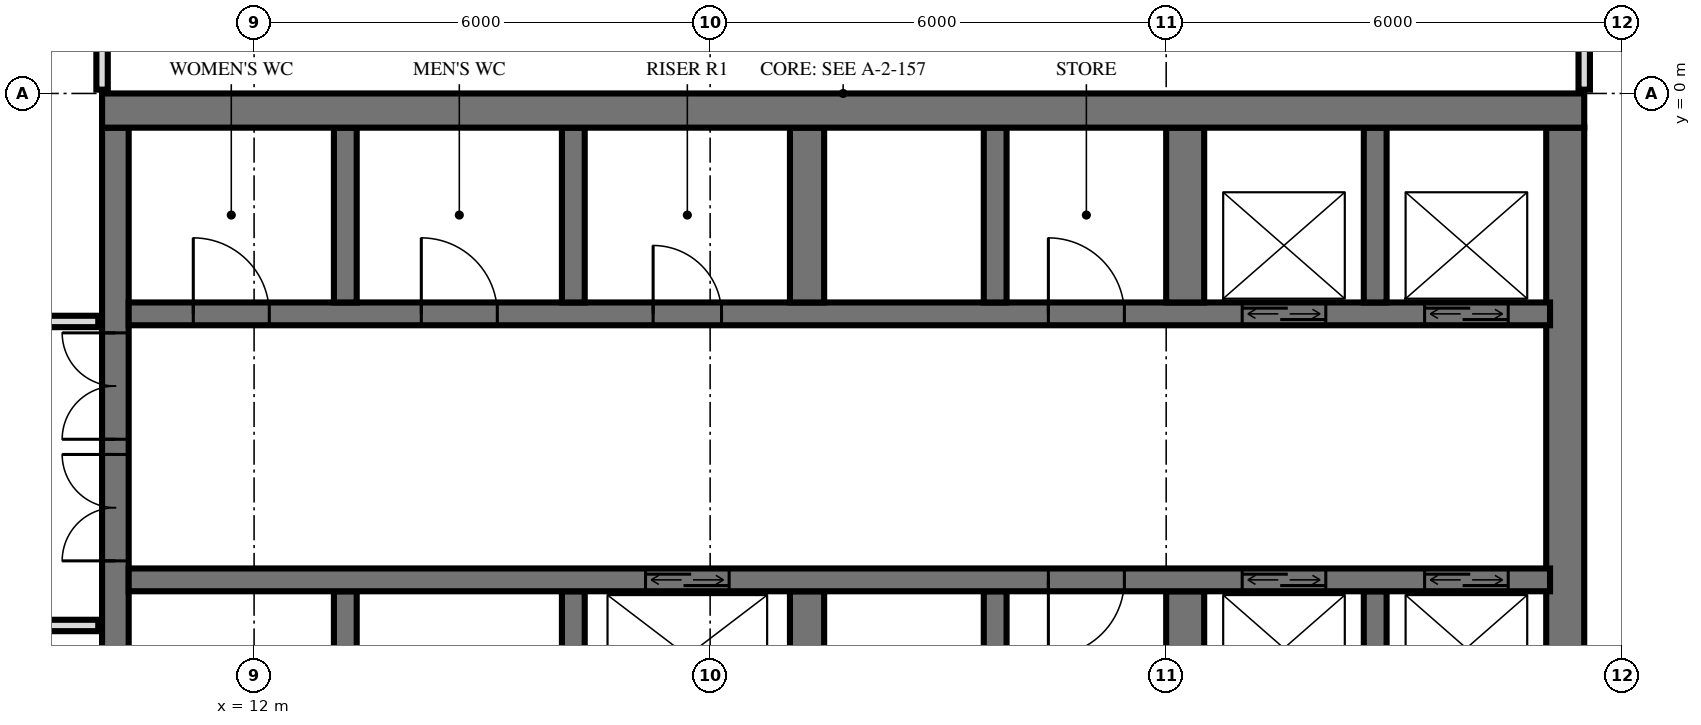
"""IFC4 building model, lengths in metres.
Left out: names, types, materials, properties, quantities, classifications, styles, units other than length and angle.
Written with IfcOpenShell. Run it as: python <this file> out.ifc"""

import sys

from ifc_helpers import new_model, si_unit, direction, frame, frame_2d, origin, place, context, subcontext, project, spatial, rectangle, extrude, element, fill, save


model = new_model("IFC4")
c1 = context("Model", 3, precision=1e-05, world=origin(), true_north=direction((0.0, 1.0)))
c2 = subcontext(c1, "Body", "Model", "MODEL_VIEW")
j1 = project(units=[si_unit("LENGTHUNIT", "METRE"), si_unit("PLANEANGLEUNIT", "RADIAN")], contexts=[c1])
p1 = place(None, origin())
s1 = spatial("IfcSite", under=j1, at=p1, CompositionType="ELEMENT")
p2 = place(p1, origin())
s2 = spatial("IfcBuilding", under=s1, at=p2, CompositionType="ELEMENT")
p3 = place(p2, frame((0.0, 0.0, 96.0)))
s3 = spatial("IfcBuildingStorey", under=s2, at=p3, CompositionType="ELEMENT", Elevation=96.0)
p4 = place(p3, frame((10.0, -0.225, 0.0), z_axis=(0.0, 0.0, 1.0), x_axis=(1.0, 0.0, 0.0)))
e1 = element("IfcWall", 1, at=p4, inside=s3, PredefinedType="SHEAR", context=c2, shape_type="SweptSolid", body=[
    extrude(rectangle(XDim=19.5, YDim=0.45, at=frame_2d((9.75, 0.0))), origin(), (0.0, 0.0, 1.0), 3.6),
])
p5 = place(p3, frame((10.175, -14.55, 0.0), z_axis=(0.0, 0.0, 1.0), x_axis=(0.0, 1.0, 0.0)))
e2 = element("IfcWall", 2, at=p5, inside=s3, PredefinedType="SHEAR", context=c2, shape_type="SweptSolid", body=[
    extrude(rectangle(XDim=14.1, YDim=0.35, at=frame_2d((7.05, 0.0))), origin(), (0.0, 0.0, 1.0), 3.6),
])
p6 = place(p5, frame((8.4, 0.0, 0.0)))
e3 = element("IfcOpeningElement", 3, at=p6, cuts=e2, PredefinedType="OPENING", context=c2, shape_type="SweptSolid", body=[
    extrude(rectangle(XDim=1.4, YDim=2.4, at=frame_2d((0.7, 1.2))), frame((0.0, 0.185, 0.0), z_axis=(0.0, -1.0, 0.0), x_axis=(1.0, 0.0, 0.0)), (0.0, 0.0, 1.0), 0.37),
])
p7 = place(p5, frame((10.0, 0.0, 0.0)))
e4 = element("IfcOpeningElement", 4, at=p7, cuts=e2, PredefinedType="OPENING", context=c2, shape_type="SweptSolid", body=[
    extrude(rectangle(XDim=1.4, YDim=2.4, at=frame_2d((0.7, 1.2))), frame((0.0, 0.185, 0.0), z_axis=(0.0, -1.0, 0.0), x_axis=(1.0, 0.0, 0.0)), (0.0, 0.0, 1.0), 0.37),
])
p8 = place(p5, frame((4.0, 0.0, 0.0)))
e5 = element("IfcOpeningElement", 5, at=p8, cuts=e2, PredefinedType="OPENING", context=c2, shape_type="SweptSolid", body=[
    extrude(rectangle(XDim=1.2, YDim=2.1, at=frame_2d((0.6, 1.05))), frame((0.0, 0.185, 0.0), z_axis=(0.0, -1.0, 0.0), x_axis=(1.0, 0.0, 0.0)), (0.0, 0.0, 1.0), 0.37),
])
p9 = place(p3, frame((29.25, -14.55, 0.0), z_axis=(0.0, 0.0, 1.0), x_axis=(0.0, 1.0, 0.0)))
e6 = element("IfcWall", 6, at=p9, inside=s3, PredefinedType="SHEAR", context=c2, shape_type="SweptSolid", body=[
    extrude(rectangle(XDim=14.1, YDim=0.5, at=frame_2d((7.05, 0.0))), origin(), (0.0, 0.0, 1.0), 3.6),
])
p10 = place(p3, frame((10.35, -2.9, 0.0), z_axis=(0.0, 0.0, 1.0), x_axis=(1.0, 0.0, 0.0)))
e7 = element("IfcWall", 7, at=p10, inside=s3, PredefinedType="SHEAR", context=c2, shape_type="SweptSolid", body=[
    extrude(rectangle(XDim=18.7, YDim=0.3, at=frame_2d((9.35, 0.0))), origin(), (0.0, 0.0, 1.0), 3.6),
])
p11 = place(p10, frame((14.65, 0.0, 0.0)))
e8 = element("IfcOpeningElement", 8, at=p11, cuts=e7, PredefinedType="OPENING", context=c2, shape_type="SweptSolid", body=[
    extrude(rectangle(XDim=1.1, YDim=2.1, at=frame_2d((0.55, 1.05))), frame((0.0, 0.16, 0.0), z_axis=(0.0, -1.0, 0.0), x_axis=(1.0, 0.0, 0.0)), (0.0, 0.0, 1.0), 0.32),
])
p12 = place(p10, frame((17.05, 0.0, 0.0)))
e9 = element("IfcOpeningElement", 9, at=p12, cuts=e7, PredefinedType="OPENING", context=c2, shape_type="SweptSolid", body=[
    extrude(rectangle(XDim=1.1, YDim=2.1, at=frame_2d((0.55, 1.05))), frame((0.0, 0.16, 0.0), z_axis=(0.0, -1.0, 0.0), x_axis=(1.0, 0.0, 0.0)), (0.0, 0.0, 1.0), 0.32),
])
p13 = place(p10, frame((6.9, 0.0, 0.0)))
e10 = element("IfcOpeningElement", 10, at=p13, cuts=e7, PredefinedType="OPENING", context=c2, shape_type="SweptSolid", body=[
    extrude(rectangle(XDim=0.9, YDim=2.1, at=frame_2d((0.45, 1.05))), frame((0.0, 0.16, 0.0), z_axis=(0.0, -1.0, 0.0), x_axis=(1.0, 0.0, 0.0)), (0.0, 0.0, 1.0), 0.32),
])
p14 = place(p10, frame((0.85, 0.0, 0.0)))
e11 = element("IfcOpeningElement", 11, at=p14, cuts=e7, PredefinedType="OPENING", context=c2, shape_type="SweptSolid", body=[
    extrude(rectangle(XDim=1.0, YDim=2.1, at=frame_2d((0.5, 1.05))), frame((0.0, 0.16, 0.0), z_axis=(0.0, -1.0, 0.0), x_axis=(1.0, 0.0, 0.0)), (0.0, 0.0, 1.0), 0.32),
])
p15 = place(p10, frame((3.85, 0.0, 0.0)))
e12 = element("IfcOpeningElement", 12, at=p15, cuts=e7, PredefinedType="OPENING", context=c2, shape_type="SweptSolid", body=[
    extrude(rectangle(XDim=1.0, YDim=2.1, at=frame_2d((0.5, 1.05))), frame((0.0, 0.16, 0.0), z_axis=(0.0, -1.0, 0.0), x_axis=(1.0, 0.0, 0.0)), (0.0, 0.0, 1.0), 0.32),
])
p16 = place(p10, frame((12.1, 0.0, 0.0)))
e13 = element("IfcOpeningElement", 13, at=p16, cuts=e7, PredefinedType="OPENING", context=c2, shape_type="SweptSolid", body=[
    extrude(rectangle(XDim=1.0, YDim=2.1, at=frame_2d((0.5, 1.05))), frame((0.0, 0.16, 0.0), z_axis=(0.0, -1.0, 0.0), x_axis=(1.0, 0.0, 0.0)), (0.0, 0.0, 1.0), 0.32),
])
p17 = place(p3, frame((10.35, -6.4, 0.0), z_axis=(0.0, 0.0, 1.0), x_axis=(1.0, 0.0, 0.0)))
e14 = element("IfcWall", 14, at=p17, inside=s3, PredefinedType="SHEAR", context=c2, shape_type="SweptSolid", body=[
    extrude(rectangle(XDim=18.7, YDim=0.3, at=frame_2d((9.35, 0.0))), origin(), (0.0, 0.0, 1.0), 3.6),
])
p18 = place(p17, frame((14.65, 0.0, 0.0)))
e15 = element("IfcOpeningElement", 15, at=p18, cuts=e14, PredefinedType="OPENING", context=c2, shape_type="SweptSolid", body=[
    extrude(rectangle(XDim=1.1, YDim=2.1, at=frame_2d((0.55, 1.05))), frame((0.0, 0.16, 0.0), z_axis=(0.0, -1.0, 0.0), x_axis=(1.0, 0.0, 0.0)), (0.0, 0.0, 1.0), 0.32),
])
p19 = place(p17, frame((17.05, 0.0, 0.0)))
e16 = element("IfcOpeningElement", 16, at=p19, cuts=e14, PredefinedType="OPENING", context=c2, shape_type="SweptSolid", body=[
    extrude(rectangle(XDim=1.1, YDim=2.1, at=frame_2d((0.55, 1.05))), frame((0.0, 0.16, 0.0), z_axis=(0.0, -1.0, 0.0), x_axis=(1.0, 0.0, 0.0)), (0.0, 0.0, 1.0), 0.32),
])
p20 = place(p17, frame((6.8, 0.0, 0.0)))
e17 = element("IfcOpeningElement", 17, at=p20, cuts=e14, PredefinedType="OPENING", context=c2, shape_type="SweptSolid", body=[
    extrude(rectangle(XDim=1.1, YDim=2.1, at=frame_2d((0.55, 1.05))), frame((0.0, 0.16, 0.0), z_axis=(0.0, -1.0, 0.0), x_axis=(1.0, 0.0, 0.0)), (0.0, 0.0, 1.0), 0.32),
])
p21 = place(p17, frame((12.1, 0.0, 0.0)))
e18 = element("IfcOpeningElement", 18, at=p21, cuts=e14, PredefinedType="OPENING", context=c2, shape_type="SweptSolid", body=[
    extrude(rectangle(XDim=1.0, YDim=2.1, at=frame_2d((0.5, 1.05))), frame((0.0, 0.16, 0.0), z_axis=(0.0, -1.0, 0.0), x_axis=(1.0, 0.0, 0.0)), (0.0, 0.0, 1.0), 0.32),
])
for number, where, z_axis, x_axis in (
    (19, (13.2, -2.75, 0.0), (0.0, 0.0, 1.0), (0.0, 1.0, 0.0)),
    (20, (13.2, -8.85, 0.0), (0.0, 0.0, 1.0), (0.0, 1.0, 0.0)),
    (21, (16.2, -2.75, 0.0), (0.0, 0.0, 1.0), (0.0, 1.0, 0.0)),
    (22, (16.2, -8.85, 0.0), (0.0, 0.0, 1.0), (0.0, 1.0, 0.0)),
):
    element("IfcWall", number, at=place(p3, frame(where, z_axis=z_axis, x_axis=x_axis)), inside=s3, PredefinedType="SHEAR", context=c2, shape_type="SweptSolid", body=[
        extrude(rectangle(XDim=2.3, YDim=0.3, at=frame_2d((1.15, 0.0))), origin(), (0.0, 0.0, 1.0), 3.6),
    ])
for number, where, z_axis, x_axis in (
    (23, (19.275, -2.75, 0.0), (0.0, 0.0, 1.0), (0.0, 1.0, 0.0)),
    (24, (19.275, -8.85, 0.0), (0.0, 0.0, 1.0), (0.0, 1.0, 0.0)),
):
    element("IfcWall", number, at=place(p3, frame(where, z_axis=z_axis, x_axis=x_axis)), inside=s3, PredefinedType="SHEAR", context=c2, shape_type="SweptSolid", body=[
        extrude(rectangle(XDim=2.3, YDim=0.45, at=frame_2d((1.15, 0.0))), origin(), (0.0, 0.0, 1.0), 3.6),
    ])
for number, where, z_axis, x_axis in (
    (25, (21.75, -2.75, 0.0), (0.0, 0.0, 1.0), (0.0, 1.0, 0.0)),
    (26, (21.75, -8.85, 0.0), (0.0, 0.0, 1.0), (0.0, 1.0, 0.0)),
):
    element("IfcWall", number, at=place(p3, frame(where, z_axis=z_axis, x_axis=x_axis)), inside=s3, PredefinedType="SHEAR", context=c2, shape_type="SweptSolid", body=[
        extrude(rectangle(XDim=2.3, YDim=0.3, at=frame_2d((1.15, 0.0))), origin(), (0.0, 0.0, 1.0), 3.6),
    ])
for number, where, z_axis, x_axis in (
    (27, (24.25, -2.75, 0.0), (0.0, 0.0, 1.0), (0.0, 1.0, 0.0)),
    (28, (24.25, -8.85, 0.0), (0.0, 0.0, 1.0), (0.0, 1.0, 0.0)),
):
    element("IfcWall", number, at=place(p3, frame(where, z_axis=z_axis, x_axis=x_axis)), inside=s3, PredefinedType="SHEAR", context=c2, shape_type="SweptSolid", body=[
        extrude(rectangle(XDim=2.3, YDim=0.5, at=frame_2d((1.15, 0.0))), origin(), (0.0, 0.0, 1.0), 3.6),
    ])
for number, where, z_axis, x_axis in (
    (29, (26.75, -2.75, 0.0), (0.0, 0.0, 1.0), (0.0, 1.0, 0.0)),
    (30, (26.75, -8.85, 0.0), (0.0, 0.0, 1.0), (0.0, 1.0, 0.0)),
):
    element("IfcWall", number, at=place(p3, frame(where, z_axis=z_axis, x_axis=x_axis)), inside=s3, PredefinedType="SHEAR", context=c2, shape_type="SweptSolid", body=[
        extrude(rectangle(XDim=2.3, YDim=0.3, at=frame_2d((1.15, 0.0))), origin(), (0.0, 0.0, 1.0), 3.6),
    ])
p22 = place(p3, frame((29.5, 0.05, 0.0), z_axis=(0.0, 0.0, 1.0), x_axis=(0.0, 1.0, 0.0)))
e31 = element("IfcWall", 31, at=p22, inside=s3, PredefinedType="PARTITIONING", context=c2, shape_type="SweptSolid", body=[
    extrude(rectangle(XDim=0.827, YDim=0.15, at=frame_2d((0.414, 0.0))), origin(), (0.0, 0.0, 1.0), 3.32),
])
p23 = place(p3, frame((10.0, 0.05, 0.0), z_axis=(0.0, 0.0, 1.0), x_axis=(0.0, 1.0, 0.0)))
e32 = element("IfcWall", 32, at=p23, inside=s3, PredefinedType="PARTITIONING", context=c2, shape_type="SweptSolid", body=[
    extrude(rectangle(XDim=0.97, YDim=0.15, at=frame_2d((0.485, 0.0))), origin(), (0.0, 0.0, 1.0), 3.32),
])
p24 = place(p3, frame((-9.95, -7.0, 0.0), z_axis=(0.0, 0.0, 1.0), x_axis=(1.0, 0.0, 0.0)))
e33 = element("IfcWall", 33, at=p24, inside=s3, PredefinedType="PARTITIONING", context=c2, shape_type="SweptSolid", body=[
    extrude(rectangle(XDim=19.9, YDim=0.15, at=frame_2d((9.95, 0.0))), origin(), (0.0, 0.0, 1.0), 3.32),
])
p25 = place(p24, frame((9.45, 0.0, 0.0)))
e34 = element("IfcOpeningElement", 34, at=p25, cuts=e33, PredefinedType="OPENING", context=c2, shape_type="SweptSolid", body=[
    extrude(rectangle(XDim=1.0, YDim=2.1, at=frame_2d((0.5, 1.05))), frame((0.0, 0.085, 0.0), z_axis=(0.0, -1.0, 0.0), x_axis=(1.0, 0.0, 0.0)), (0.0, 0.0, 1.0), 0.17),
])
p26 = place(p24, frame((3.45, 0.0, 0.0)))
e35 = element("IfcOpeningElement", 35, at=p26, cuts=e33, PredefinedType="OPENING", context=c2, shape_type="SweptSolid", body=[
    extrude(rectangle(XDim=1.0, YDim=2.1, at=frame_2d((0.5, 1.05))), frame((0.0, 0.085, 0.0), z_axis=(0.0, -1.0, 0.0), x_axis=(1.0, 0.0, 0.0)), (0.0, 0.0, 1.0), 0.17),
])
p27 = place(p3, frame((-9.95, -3.0, 0.0), z_axis=(0.0, 0.0, 1.0), x_axis=(1.0, 0.0, 0.0)))
e36 = element("IfcWall", 36, at=p27, inside=s3, PredefinedType="PARTITIONING", context=c2, shape_type="SweptSolid", body=[
    extrude(rectangle(XDim=19.9, YDim=0.15, at=frame_2d((9.95, 0.0))), origin(), (0.0, 0.0, 1.0), 3.32),
])
p28 = place(p27, frame((0.95, 0.0, 0.0)))
e37 = element("IfcOpeningElement", 37, at=p28, cuts=e36, PredefinedType="OPENING", context=c2, shape_type="SweptSolid", body=[
    extrude(rectangle(XDim=1.0, YDim=2.1, at=frame_2d((0.5, 1.05))), frame((0.0, 0.085, 0.0), z_axis=(0.0, -1.0, 0.0), x_axis=(1.0, 0.0, 0.0)), (0.0, 0.0, 1.0), 0.17),
])
p29 = place(p27, frame((3.7, 0.0, 0.0)))
e38 = element("IfcOpeningElement", 38, at=p29, cuts=e36, PredefinedType="OPENING", context=c2, shape_type="SweptSolid", body=[
    extrude(rectangle(XDim=1.0, YDim=2.1, at=frame_2d((0.5, 1.05))), frame((0.0, 0.085, 0.0), z_axis=(0.0, -1.0, 0.0), x_axis=(1.0, 0.0, 0.0)), (0.0, 0.0, 1.0), 0.17),
])
p30 = place(p27, frame((6.7, 0.0, 0.0)))
e39 = element("IfcOpeningElement", 39, at=p30, cuts=e36, PredefinedType="OPENING", context=c2, shape_type="SweptSolid", body=[
    extrude(rectangle(XDim=1.0, YDim=2.1, at=frame_2d((0.5, 1.05))), frame((0.0, 0.085, 0.0), z_axis=(0.0, -1.0, 0.0), x_axis=(1.0, 0.0, 0.0)), (0.0, 0.0, 1.0), 0.17),
])
p31 = place(p27, frame((13.95, 0.0, 0.0)))
e40 = element("IfcOpeningElement", 40, at=p31, cuts=e36, PredefinedType="OPENING", context=c2, shape_type="SweptSolid", body=[
    extrude(rectangle(XDim=1.0, YDim=2.1, at=frame_2d((0.5, 1.05))), frame((0.0, 0.085, 0.0), z_axis=(0.0, -1.0, 0.0), x_axis=(1.0, 0.0, 0.0)), (0.0, 0.0, 1.0), 0.17),
])
p32 = place(p11, origin())
e41 = element("IfcDoor", 41, at=p32, inside=s3, OperationType="DOUBLE_DOOR_SLIDING", PredefinedType="USERDEFINED", context=c2, shape_type="SweptSolid", body=[
    extrude(rectangle(XDim=1.1, YDim=2.1, at=frame_2d((0.55, 1.05))), frame((0.0, 0.025, 0.0), z_axis=(0.0, -1.0, 0.0), x_axis=(1.0, 0.0, 0.0)), (0.0, 0.0, 1.0), 0.05),
])
fill(e8, e41)
p33 = place(p12, origin())
e42 = element("IfcDoor", 42, at=p33, inside=s3, OperationType="DOUBLE_DOOR_SLIDING", PredefinedType="USERDEFINED", context=c2, shape_type="SweptSolid", body=[
    extrude(rectangle(XDim=1.1, YDim=2.1, at=frame_2d((0.55, 1.05))), frame((0.0, 0.025, 0.0), z_axis=(0.0, -1.0, 0.0), x_axis=(1.0, 0.0, 0.0)), (0.0, 0.0, 1.0), 0.05),
])
fill(e9, e42)
p34 = place(p18, origin())
e43 = element("IfcDoor", 43, at=p34, inside=s3, OperationType="DOUBLE_DOOR_SLIDING", PredefinedType="USERDEFINED", context=c2, shape_type="SweptSolid", body=[
    extrude(rectangle(XDim=1.1, YDim=2.1, at=frame_2d((0.55, 1.05))), frame((0.0, 0.025, 0.0), z_axis=(0.0, -1.0, 0.0), x_axis=(1.0, 0.0, 0.0)), (0.0, 0.0, 1.0), 0.05),
])
fill(e15, e43)
p35 = place(p19, origin())
e44 = element("IfcDoor", 44, at=p35, inside=s3, OperationType="DOUBLE_DOOR_SLIDING", PredefinedType="USERDEFINED", context=c2, shape_type="SweptSolid", body=[
    extrude(rectangle(XDim=1.1, YDim=2.1, at=frame_2d((0.55, 1.05))), frame((0.0, 0.025, 0.0), z_axis=(0.0, -1.0, 0.0), x_axis=(1.0, 0.0, 0.0)), (0.0, 0.0, 1.0), 0.05),
])
fill(e16, e44)
p36 = place(p20, origin())
e45 = element("IfcDoor", 45, at=p36, inside=s3, OperationType="DOUBLE_DOOR_SLIDING", PredefinedType="USERDEFINED", context=c2, shape_type="SweptSolid", body=[
    extrude(rectangle(XDim=1.1, YDim=2.1, at=frame_2d((0.55, 1.05))), frame((0.0, 0.025, 0.0), z_axis=(0.0, -1.0, 0.0), x_axis=(1.0, 0.0, 0.0)), (0.0, 0.0, 1.0), 0.05),
])
fill(e17, e45)
p37 = place(p6, origin())
e46 = element("IfcDoor", 46, at=p37, inside=s3, OperationType="DOUBLE_DOOR_SINGLE_SWING", PredefinedType="DOOR", context=c2, shape_type="SweptSolid", body=[
    extrude(rectangle(XDim=1.4, YDim=2.4, at=frame_2d((0.7, 1.2))), frame((0.0, 0.025, 0.0), z_axis=(0.0, -1.0, 0.0), x_axis=(1.0, 0.0, 0.0)), (0.0, 0.0, 1.0), 0.05),
])
fill(e3, e46)
p38 = place(p7, origin())
e47 = element("IfcDoor", 47, at=p38, inside=s3, OperationType="DOUBLE_DOOR_SINGLE_SWING", PredefinedType="DOOR", context=c2, shape_type="SweptSolid", body=[
    extrude(rectangle(XDim=1.4, YDim=2.4, at=frame_2d((0.7, 1.2))), frame((0.0, 0.025, 0.0), z_axis=(0.0, -1.0, 0.0), x_axis=(1.0, 0.0, 0.0)), (0.0, 0.0, 1.0), 0.05),
])
fill(e4, e47)
p39 = place(p13, origin())
e48 = element("IfcDoor", 48, at=p39, inside=s3, OperationType="SINGLE_SWING_RIGHT", PredefinedType="DOOR", context=c2, shape_type="SweptSolid", body=[
    extrude(rectangle(XDim=0.9, YDim=2.1, at=frame_2d((0.45, 1.05))), frame((0.0, 0.025, 0.0), z_axis=(0.0, -1.0, 0.0), x_axis=(1.0, 0.0, 0.0)), (0.0, 0.0, 1.0), 0.05),
])
fill(e10, e48)
p40 = place(p14, origin())
e49 = element("IfcDoor", 49, at=p40, inside=s3, OperationType="SINGLE_SWING_RIGHT", PredefinedType="DOOR", context=c2, shape_type="SweptSolid", body=[
    extrude(rectangle(XDim=1.0, YDim=2.1, at=frame_2d((0.5, 1.05))), frame((0.0, 0.025, 0.0), z_axis=(0.0, -1.0, 0.0), x_axis=(1.0, 0.0, 0.0)), (0.0, 0.0, 1.0), 0.05),
])
fill(e11, e49)
p41 = place(p15, origin())
e50 = element("IfcDoor", 50, at=p41, inside=s3, OperationType="SINGLE_SWING_RIGHT", PredefinedType="DOOR", context=c2, shape_type="SweptSolid", body=[
    extrude(rectangle(XDim=1.0, YDim=2.1, at=frame_2d((0.5, 1.05))), frame((0.0, 0.025, 0.0), z_axis=(0.0, -1.0, 0.0), x_axis=(1.0, 0.0, 0.0)), (0.0, 0.0, 1.0), 0.05),
])
fill(e12, e50)
p42 = place(p16, origin())
e51 = element("IfcDoor", 51, at=p42, inside=s3, OperationType="SINGLE_SWING_RIGHT", PredefinedType="DOOR", context=c2, shape_type="SweptSolid", body=[
    extrude(rectangle(XDim=1.0, YDim=2.1, at=frame_2d((0.5, 1.05))), frame((0.0, 0.025, 0.0), z_axis=(0.0, -1.0, 0.0), x_axis=(1.0, 0.0, 0.0)), (0.0, 0.0, 1.0), 0.05),
])
fill(e13, e51)
p43 = place(p21, frame((0.5, 0.0, 0.0), z_axis=(0.0, 0.0, 1.0), x_axis=(-1.0, 0.0, 0.0)))
e52 = element("IfcDoor", 52, at=p43, inside=s3, OperationType="SINGLE_SWING_LEFT", PredefinedType="DOOR", context=c2, shape_type="SweptSolid", body=[
    extrude(rectangle(XDim=1.0, YDim=2.1, at=frame_2d((0.0, 1.05))), frame((0.0, -0.025, 0.0), z_axis=(0.0, 1.0, 0.0), x_axis=(-1.0, 0.0, 0.0)), (0.0, 0.0, 1.0), 0.05),
])
fill(e18, e52)
save(model, sys.argv[1])
